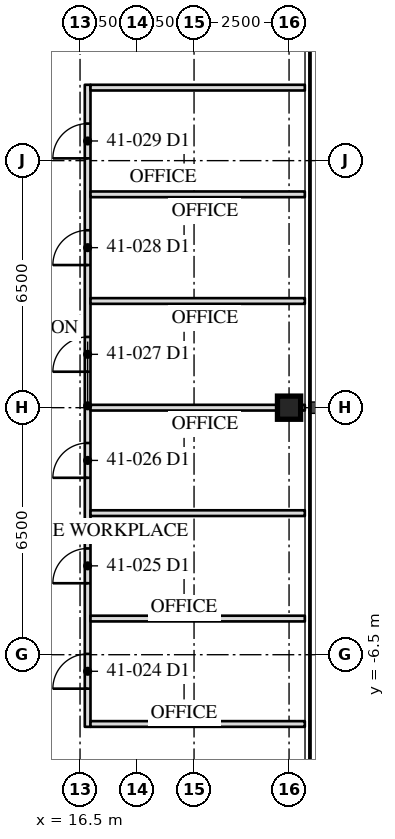
"""IFC4 building model, lengths in metres.
Left out: names, types, materials, properties, quantities, classifications, styles, units other than length and angle.
Written with IfcOpenShell. Run it as: python <this file> out.ifc"""

import sys

from ifc_helpers import new_model, si_unit, direction, frame, frame_2d, origin, origin_2d, place, context, subcontext, project, spatial, rectangle, hollow_rectangle, extrude, element, fill, save


model = new_model("IFC4")
c1 = context("Model", 3, precision=1e-05, world=origin(), true_north=direction((0.0, 1.0)))
c2 = subcontext(c1, "Body", "Model", "MODEL_VIEW")
j1 = project(units=[si_unit("LENGTHUNIT", "METRE"), si_unit("PLANEANGLEUNIT", "RADIAN")], contexts=[c1])
p1 = place(None, origin())
s1 = spatial("IfcSite", under=j1, at=p1, CompositionType="ELEMENT")
p2 = place(p1, origin())
s2 = spatial("IfcBuilding", under=s1, at=p2, CompositionType="ELEMENT")
p3 = place(p2, frame((0.0, 0.0, 174.6)))
s3 = spatial("IfcBuildingStorey", under=s2, at=p3, CompositionType="ELEMENT", Elevation=174.6)
p4 = place(p3, frame((22.0, 0.0, 0.0), z_axis=(0.0, 0.0, 1.0), x_axis=(0.0, 1.0, 0.0)))
e1 = element("IfcColumn", 1, at=p4, inside=s3, PredefinedType="COLUMN", context=c2, shape_type="SweptSolid", body=[
    extrude(hollow_rectangle(XDim=0.61, YDim=0.61, WallThickness=0.076, at=origin_2d()), origin(), (0.0, 0.0, 1.0), 4.1),
])
p5 = place(p3, frame((16.7, -8.398, 0.0), z_axis=(0.0, 0.0, 1.0), x_axis=(0.0, 1.0, 0.0)))
e2 = element("IfcWall", 2, at=p5, inside=s3, PredefinedType="PARTITIONING", context=c2, shape_type="SweptSolid", body=[
    extrude(rectangle(XDim=16.894, YDim=0.15, at=frame_2d((8.447, 0.0))), origin(), (0.0, 0.0, 1.0), 3.91),
])
p6 = place(p5, frame((1.004, 0.0, 0.0)))
e3 = element("IfcOpeningElement", 3, at=p6, cuts=e2, PredefinedType="OPENING", context=c2, shape_type="SweptSolid", body=[
    extrude(rectangle(XDim=0.915, YDim=2.134, at=frame_2d((0.458, 1.067))), frame((0.0, 0.085, 0.0), z_axis=(0.0, -1.0, 0.0), x_axis=(1.0, 0.0, 0.0)), (0.0, 0.0, 1.0), 0.17),
])
p7 = place(p5, frame((3.779, 0.0, 0.0)))
e4 = element("IfcOpeningElement", 4, at=p7, cuts=e2, PredefinedType="OPENING", context=c2, shape_type="SweptSolid", body=[
    extrude(rectangle(XDim=0.915, YDim=2.134, at=frame_2d((0.458, 1.067))), frame((0.0, 0.085, 0.0), z_axis=(0.0, -1.0, 0.0), x_axis=(1.0, 0.0, 0.0)), (0.0, 0.0, 1.0), 0.17),
])
p8 = place(p5, frame((6.553, 0.0, 0.0)))
e5 = element("IfcOpeningElement", 5, at=p8, cuts=e2, PredefinedType="OPENING", context=c2, shape_type="SweptSolid", body=[
    extrude(rectangle(XDim=0.915, YDim=2.134, at=frame_2d((0.458, 1.067))), frame((0.0, 0.085, 0.0), z_axis=(0.0, -1.0, 0.0), x_axis=(1.0, 0.0, 0.0)), (0.0, 0.0, 1.0), 0.17),
])
p9 = place(p5, frame((9.344, 0.0, 0.0)))
e6 = element("IfcOpeningElement", 6, at=p9, cuts=e2, PredefinedType="OPENING", context=c2, shape_type="SweptSolid", body=[
    extrude(rectangle(XDim=0.915, YDim=2.134, at=frame_2d((0.458, 1.067))), frame((0.0, 0.085, 0.0), z_axis=(0.0, -1.0, 0.0), x_axis=(1.0, 0.0, 0.0)), (0.0, 0.0, 1.0), 0.17),
])
p10 = place(p5, frame((12.151, 0.0, 0.0)))
e7 = element("IfcOpeningElement", 7, at=p10, cuts=e2, PredefinedType="OPENING", context=c2, shape_type="SweptSolid", body=[
    extrude(rectangle(XDim=0.915, YDim=2.134, at=frame_2d((0.458, 1.067))), frame((0.0, 0.085, 0.0), z_axis=(0.0, -1.0, 0.0), x_axis=(1.0, 0.0, 0.0)), (0.0, 0.0, 1.0), 0.17),
])
p11 = place(p5, frame((14.958, 0.0, 0.0)))
e8 = element("IfcOpeningElement", 8, at=p11, cuts=e2, PredefinedType="OPENING", context=c2, shape_type="SweptSolid", body=[
    extrude(rectangle(XDim=0.915, YDim=2.134, at=frame_2d((0.458, 1.067))), frame((0.0, 0.085, 0.0), z_axis=(0.0, -1.0, 0.0), x_axis=(1.0, 0.0, 0.0)), (0.0, 0.0, 1.0), 0.17),
])
for number, where, z_axis, x_axis in (
    (9, (16.775, -8.323, 0.0), (0.0, 0.0, 1.0), (1.0, 0.0, 0.0)),
    (10, (16.775, -5.549, 0.0), (0.0, 0.0, 1.0), (1.0, 0.0, 0.0)),
    (11, (16.775, -2.775, 0.0), (0.0, 0.0, 1.0), (1.0, 0.0, 0.0)),
):
    element("IfcWall", number, at=place(p3, frame(where, z_axis=z_axis, x_axis=x_axis)), inside=s3, PredefinedType="PARTITIONING", context=c2, shape_type="SweptSolid", body=[
        extrude(rectangle(XDim=5.64, YDim=0.15, at=frame_2d((2.82, 0.0))), origin(), (0.0, 0.0, 1.0), 3.91),
    ])
p12 = place(p3, frame((16.775, 0.0, 0.0), z_axis=(0.0, 0.0, 1.0), x_axis=(1.0, 0.0, 0.0)))
e12 = element("IfcWall", 12, at=p12, inside=s3, PredefinedType="PARTITIONING", context=c2, shape_type="SweptSolid", body=[
    extrude(rectangle(XDim=5.64, YDim=0.15, at=frame_2d((2.82, 0.0))), origin(), (0.0, 0.0, 1.0), 3.3),
])
for number, where, z_axis, x_axis in (
    (13, (16.775, 2.807, 0.0), (0.0, 0.0, 1.0), (1.0, 0.0, 0.0)),
    (14, (16.775, 5.614, 0.0), (0.0, 0.0, 1.0), (1.0, 0.0, 0.0)),
    (15, (16.775, 8.421, 0.0), (0.0, 0.0, 1.0), (1.0, 0.0, 0.0)),
):
    element("IfcWall", number, at=place(p3, frame(where, z_axis=z_axis, x_axis=x_axis)), inside=s3, PredefinedType="PARTITIONING", context=c2, shape_type="SweptSolid", body=[
        extrude(rectangle(XDim=5.64, YDim=0.15, at=frame_2d((2.82, 0.0))), origin(), (0.0, 0.0, 1.0), 3.91),
    ])
p13 = place(p6, origin())
e16 = element("IfcDoor", 16, at=p13, inside=s3, OperationType="SINGLE_SWING_LEFT", PredefinedType="DOOR", context=c2, shape_type="SweptSolid", body=[
    extrude(rectangle(XDim=0.915, YDim=2.134, at=frame_2d((0.458, 1.067))), frame((0.0, 0.025, 0.0), z_axis=(0.0, -1.0, 0.0), x_axis=(1.0, 0.0, 0.0)), (0.0, 0.0, 1.0), 0.05),
])
fill(e3, e16)
p14 = place(p7, origin())
e17 = element("IfcDoor", 17, at=p14, inside=s3, OperationType="SINGLE_SWING_LEFT", PredefinedType="DOOR", context=c2, shape_type="SweptSolid", body=[
    extrude(rectangle(XDim=0.915, YDim=2.134, at=frame_2d((0.458, 1.067))), frame((0.0, 0.025, 0.0), z_axis=(0.0, -1.0, 0.0), x_axis=(1.0, 0.0, 0.0)), (0.0, 0.0, 1.0), 0.05),
])
fill(e4, e17)
p15 = place(p8, origin())
e18 = element("IfcDoor", 18, at=p15, inside=s3, OperationType="SINGLE_SWING_LEFT", PredefinedType="DOOR", context=c2, shape_type="SweptSolid", body=[
    extrude(rectangle(XDim=0.915, YDim=2.134, at=frame_2d((0.458, 1.067))), frame((0.0, 0.025, 0.0), z_axis=(0.0, -1.0, 0.0), x_axis=(1.0, 0.0, 0.0)), (0.0, 0.0, 1.0), 0.05),
])
fill(e5, e18)
p16 = place(p9, origin())
e19 = element("IfcDoor", 19, at=p16, inside=s3, OperationType="SINGLE_SWING_LEFT", PredefinedType="DOOR", context=c2, shape_type="SweptSolid", body=[
    extrude(rectangle(XDim=0.915, YDim=2.134, at=frame_2d((0.458, 1.067))), frame((0.0, 0.025, 0.0), z_axis=(0.0, -1.0, 0.0), x_axis=(1.0, 0.0, 0.0)), (0.0, 0.0, 1.0), 0.05),
])
fill(e6, e19)
p17 = place(p10, origin())
e20 = element("IfcDoor", 20, at=p17, inside=s3, OperationType="SINGLE_SWING_LEFT", PredefinedType="DOOR", context=c2, shape_type="SweptSolid", body=[
    extrude(rectangle(XDim=0.915, YDim=2.134, at=frame_2d((0.458, 1.067))), frame((0.0, 0.025, 0.0), z_axis=(0.0, -1.0, 0.0), x_axis=(1.0, 0.0, 0.0)), (0.0, 0.0, 1.0), 0.05),
])
fill(e7, e20)
p18 = place(p11, origin())
e21 = element("IfcDoor", 21, at=p18, inside=s3, OperationType="SINGLE_SWING_LEFT", PredefinedType="DOOR", context=c2, shape_type="SweptSolid", body=[
    extrude(rectangle(XDim=0.915, YDim=2.134, at=frame_2d((0.458, 1.067))), frame((0.0, 0.025, 0.0), z_axis=(0.0, -1.0, 0.0), x_axis=(1.0, 0.0, 0.0)), (0.0, 0.0, 1.0), 0.05),
])
fill(e8, e21)
save(model, sys.argv[1])
